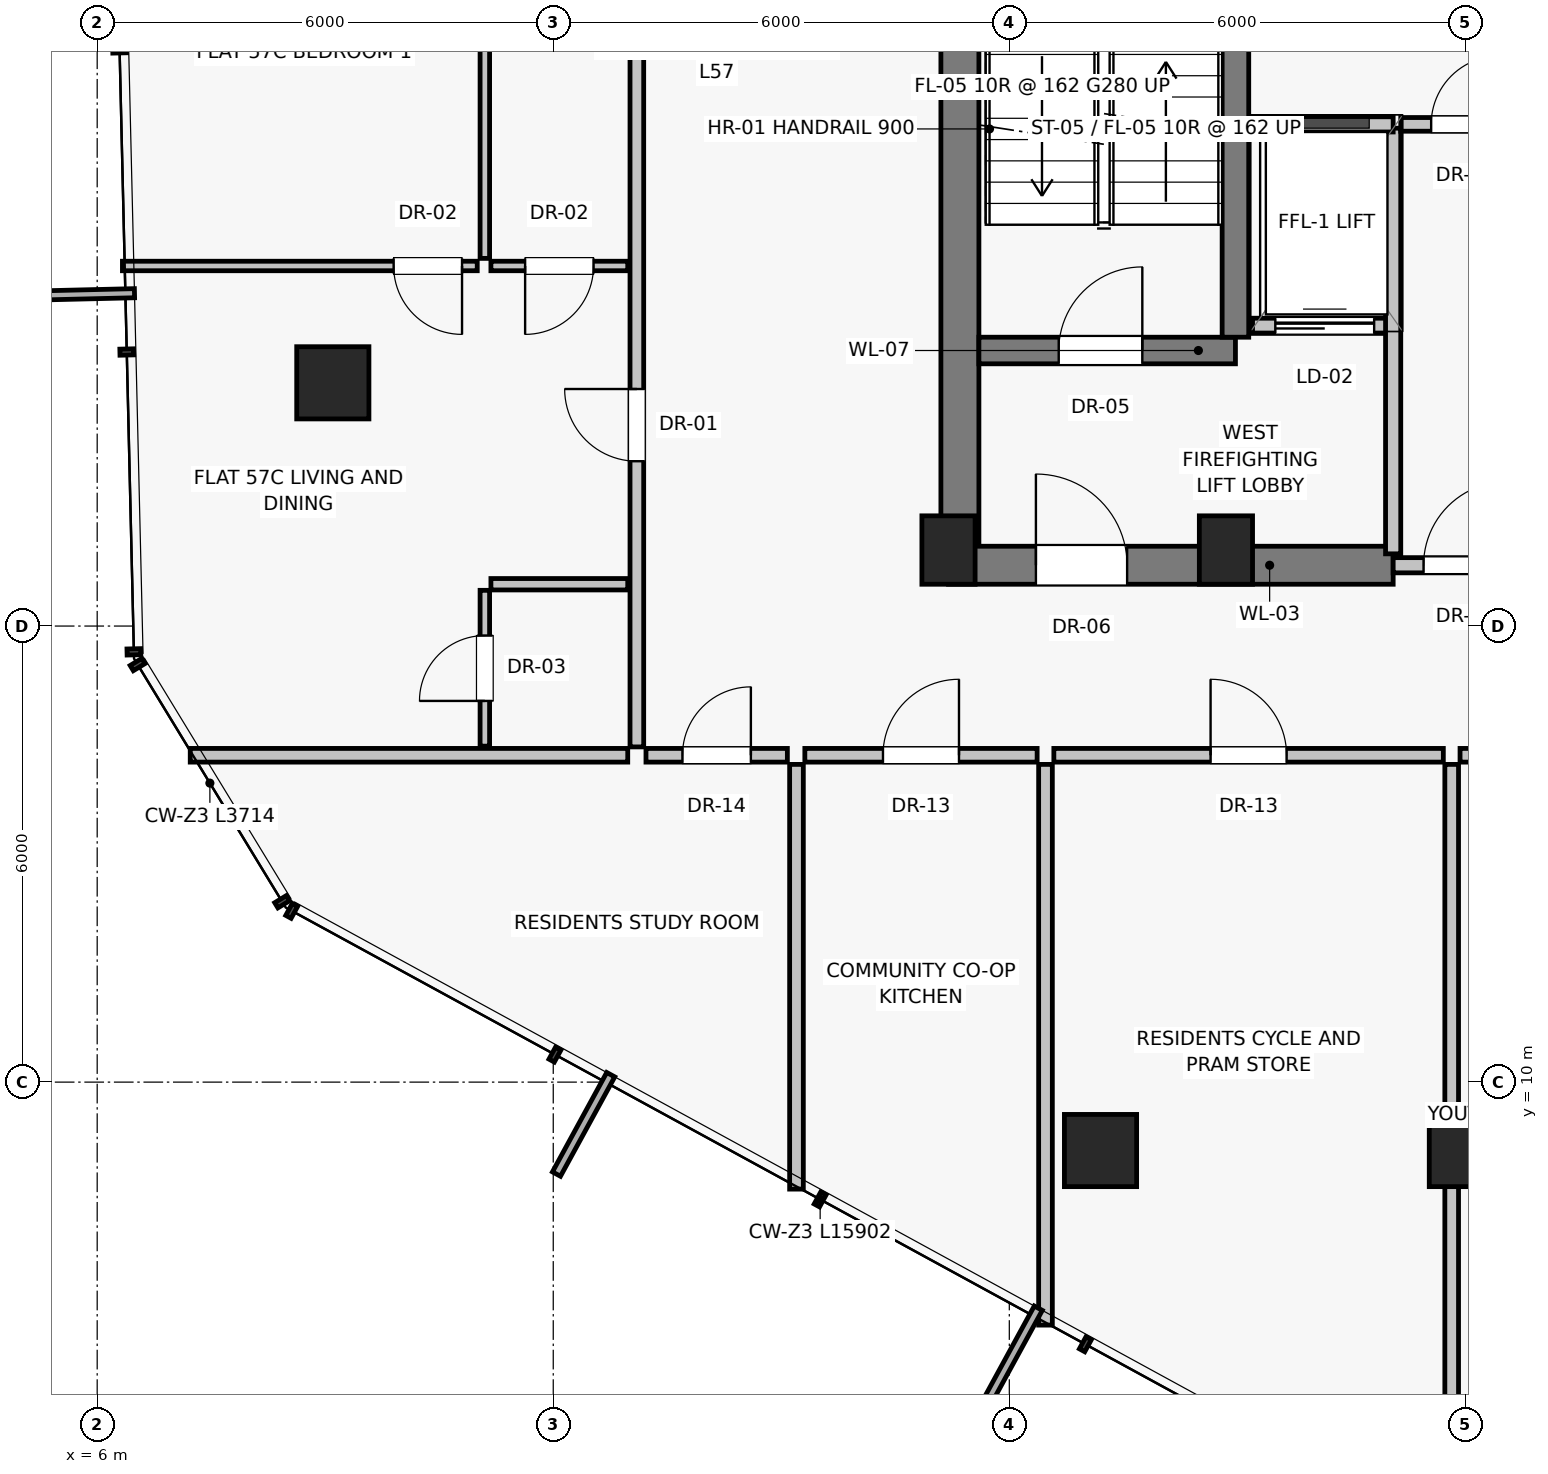
"""IFC4 building model, lengths in metres.
Left out: names, types, materials, properties, quantities, classifications, styles, units other than length and angle.
Written with IfcOpenShell. Run it as: python <this file> out.ifc"""

import sys

from ifc_helpers import new_model, si_unit, direction, frame, frame_2d, origin, origin_2d, place, context, subcontext, project, spatial, rectangle, extrude, source, transform, mapped, element, fill, save


model = new_model("IFC4")
c1 = context("Model", 3, precision=1e-05, world=origin(), true_north=direction((0.0, 1.0)))
c2 = subcontext(c1, "Body", "Model", "MODEL_VIEW")
j1 = project(units=[si_unit("LENGTHUNIT", "METRE"), si_unit("PLANEANGLEUNIT", "RADIAN")], contexts=[c1])
p1 = place(None, origin())
s1 = spatial("IfcSite", under=j1, at=p1, CompositionType="ELEMENT")
p2 = place(p1, origin())
s2 = spatial("IfcBuilding", under=s1, at=p2, CompositionType="ELEMENT")
p3 = place(p2, frame((0.0, 0.0, 201.6)))
s3 = spatial("IfcBuildingStorey", under=s2, at=p3, CompositionType="ELEMENT", Elevation=201.6)
for number, where, z_axis, x_axis in (
    (1, (17.2, 17.0, 0.0), (0.0, 0.0, 1.0), (1.0, 0.0, 0.0)),
    (2, (20.85, 17.0, 0.0), (0.0, 0.0, 1.0), (1.0, 0.0, 0.0)),
):
    element("IfcColumn", number, at=place(p3, frame(where, z_axis=z_axis, x_axis=x_axis)), inside=s3, PredefinedType="PILASTER", context=c2, shape_type="SweptSolid", body=[
        extrude(rectangle(XDim=0.7, YDim=0.9, at=origin_2d()), origin(), (0.0, 0.0, 1.0), 3.25),
    ])
for number, where, z_axis, x_axis in (
    (3, (9.1, 24.0, 0.0), (0.0, 0.0, 1.0), (1.0, 0.0, 0.0)),
    (4, (9.1, 19.2, 0.0), (0.0, 0.0, 1.0), (1.0, 0.0, 0.0)),
    (5, (19.2, 9.1, 0.0), (0.0, 0.0, 1.0), (1.0, 0.0, 0.0)),
    (6, (24.0, 9.1, 0.0), (0.0, 0.0, 1.0), (1.0, 0.0, 0.0)),
):
    element("IfcColumn", number, at=place(p3, frame(where, z_axis=z_axis, x_axis=x_axis)), inside=s3, PredefinedType="COLUMN", context=c2, shape_type="SweptSolid", body=[
        extrude(rectangle(XDim=0.95, YDim=0.95, at=origin_2d()), origin(), (0.0, 0.0, 1.0), 3.25),
    ])
p4 = place(p3, frame((17.35, 16.8, 0.0), z_axis=(0.0, 0.0, 1.0), x_axis=(0.0, 1.0, 0.0)))
e7 = element("IfcWall", 7, at=p4, inside=s3, PredefinedType="SHEAR", context=c2, shape_type="SweptSolid", body=[
    extrude(rectangle(XDim=14.2, YDim=0.5, at=frame_2d((7.1, 0.0))), origin(), (0.0, 0.0, 1.0), 3.015),
])
p5 = place(p3, frame((17.2, 16.8, 0.0), z_axis=(0.0, 0.0, 1.0), x_axis=(1.0, 0.0, 0.0)))
e8 = element("IfcWall", 8, at=p5, inside=s3, PredefinedType="SHEAR", context=c2, shape_type="SweptSolid", body=[
    extrude(rectangle(XDim=5.85, YDim=0.5, at=frame_2d((2.925, 0.0))), origin(), (0.0, 0.0, 1.0), 3.015),
])
p6 = place(p5, frame((1.15, 0.0, 0.0)))
e9 = element("IfcOpeningElement", 9, at=p6, cuts=e8, PredefinedType="OPENING", context=c2, shape_type="SweptSolid", body=[
    extrude(rectangle(XDim=1.2, YDim=2.03, at=frame_2d((0.6, 1.015))), frame((0.0, 0.26, 0.0), z_axis=(0.0, -1.0, 0.0), x_axis=(1.0, 0.0, 0.0)), (0.0, 0.0, 1.0), 0.52),
])
p7 = place(p3, frame((23.05, 16.8, 0.0), z_axis=(0.0, 0.0, 1.0), x_axis=(1.0, 0.0, 0.0)))
e10 = element("IfcWall", 10, at=p7, inside=s3, PredefinedType="SOLIDWALL", context=c2, shape_type="SweptSolid", body=[
    extrude(rectangle(XDim=1.9, YDim=0.2, at=frame_2d((0.95, 0.0))), origin(), (0.0, 0.0, 1.0), 2.165),
])
p8 = place(p7, frame((0.4, 0.0, 0.0)))
e11 = element("IfcOpeningElement", 11, at=p8, cuts=e10, PredefinedType="OPENING", context=c2, shape_type="SweptSolid", body=[
    extrude(rectangle(XDim=1.1, YDim=2.03, at=frame_2d((0.55, 1.015))), frame((0.0, 0.11, 0.0), z_axis=(0.0, -1.0, 0.0), x_axis=(1.0, 0.0, 0.0)), (0.0, 0.0, 1.0), 0.22),
])
p9 = place(p3, frame((17.6, 19.625, 0.0), z_axis=(0.0, 0.0, 1.0), x_axis=(1.0, 0.0, 0.0)))
e12 = element("IfcWall", 12, at=p9, inside=s3, PredefinedType="SHEAR", context=c2, shape_type="SweptSolid", body=[
    extrude(rectangle(XDim=3.375, YDim=0.35, at=frame_2d((1.688, 0.0))), origin(), (0.0, 0.0, 1.0), 3.015),
])
p10 = place(p9, frame((1.05, 0.0, 0.0)))
e13 = element("IfcOpeningElement", 13, at=p10, cuts=e12, PredefinedType="OPENING", context=c2, shape_type="SweptSolid", body=[
    extrude(rectangle(XDim=1.1, YDim=2.03, at=frame_2d((0.55, 1.015))), frame((0.0, 0.185, 0.0), z_axis=(0.0, -1.0, 0.0), x_axis=(1.0, 0.0, 0.0)), (0.0, 0.0, 1.0), 0.37),
])
p11 = place(p3, frame((21.2, 19.95, 0.0), z_axis=(0.0, 0.0, 1.0), x_axis=(1.0, 0.0, 0.0)))
e14 = element("IfcWall", 14, at=p11, inside=s3, PredefinedType="SOLIDWALL", context=c2, shape_type="SweptSolid", body=[
    extrude(rectangle(XDim=1.85, YDim=0.2, at=frame_2d((0.925, 0.0))), origin(), (0.0, 0.0, 1.0), 3.015),
])
p12 = place(p11, frame((0.3, 0.0, 0.0)))
e15 = element("IfcOpeningElement", 15, at=p12, cuts=e14, PredefinedType="OPENING", context=c2, shape_type="SweptSolid", body=[
    extrude(rectangle(XDim=1.3, YDim=2.25, at=frame_2d((0.65, 1.125))), frame((0.0, 0.11, 0.0), z_axis=(0.0, -1.0, 0.0), x_axis=(1.0, 0.0, 0.0)), (0.0, 0.0, 1.0), 0.22),
])
p13 = place(p3, frame((20.975, 19.8, 0.0), z_axis=(0.0, 0.0, 1.0), x_axis=(0.0, 1.0, 0.0)))
e16 = element("IfcWall", 16, at=p13, inside=s3, PredefinedType="SHEAR", context=c2, shape_type="SweptSolid", body=[
    extrude(rectangle(XDim=8.775, YDim=0.35, at=frame_2d((4.387, 0.0))), origin(), (0.0, 0.0, 1.0), 3.015),
])
p14 = place(p3, frame((23.05, 16.95, 0.0), z_axis=(0.0, 0.0, 1.0), x_axis=(0.0, 1.0, 0.0)))
e17 = element("IfcWall", 17, at=p14, inside=s3, PredefinedType="SOLIDWALL", context=c2, shape_type="SweptSolid", body=[
    extrude(rectangle(XDim=5.6, YDim=0.2, at=frame_2d((2.8, 0.0))), origin(), (0.0, 0.0, 1.0), 3.015),
])
p15 = place(p3, frame((21.2, 22.6, 0.0), z_axis=(0.0, 0.0, 1.0), x_axis=(1.0, 0.0, 0.0)))
e18 = element("IfcWall", 18, at=p15, inside=s3, PredefinedType="SOLIDWALL", context=c2, shape_type="SweptSolid", body=[
    extrude(rectangle(XDim=1.85, YDim=0.2, at=frame_2d((0.925, 0.0))), origin(), (0.0, 0.0, 1.0), 3.015),
])
p16 = place(p3, frame((23.15, 22.6, 0.0), z_axis=(0.0, 0.0, 1.0), x_axis=(1.0, 0.0, 0.0)))
e19 = element("IfcWall", 19, at=p16, inside=s3, PredefinedType="PARTITIONING", context=c2, shape_type="SweptSolid", body=[
    extrude(rectangle(XDim=1.7, YDim=0.18, at=frame_2d((0.85, 0.0))), origin(), (0.0, 0.0, 1.0), 3.015),
])
p17 = place(p16, frame((0.4, 0.0, 0.0)))
e20 = element("IfcOpeningElement", 20, at=p17, cuts=e19, PredefinedType="OPENING", context=c2, shape_type="SweptSolid", body=[
    extrude(rectangle(XDim=0.9, YDim=2.01, at=frame_2d((0.45, 1.005))), frame((0.0, 0.1, 0.0), z_axis=(0.0, -1.0, 0.0), x_axis=(1.0, 0.0, 0.0)), (0.0, 0.0, 1.0), 0.2),
])
p18 = place(p3, frame((15.2, 14.18, 0.0), z_axis=(0.0, 0.0, 1.0), x_axis=(0.0, -1.0, 0.0)))
e21 = element("IfcWall", 21, at=p18, inside=s3, PredefinedType="PARTITIONING", context=c2, shape_type="SweptSolid", body=[
    extrude(rectangle(XDim=5.587, YDim=0.18, at=frame_2d((2.794, 0.0))), origin(), (0.0, 0.0, 1.0), 3.015),
])
p19 = place(p3, frame((15.31, 14.3, 0.0), z_axis=(0.0, 0.0, 1.0), x_axis=(1.0, 0.0, 0.0)))
e22 = element("IfcWall", 22, at=p19, inside=s3, PredefinedType="PARTITIONING", context=c2, shape_type="SweptSolid", body=[
    extrude(rectangle(XDim=3.056, YDim=0.18, at=frame_2d((1.528, 0.0))), origin(), (0.0, 0.0, 1.0), 3.015),
])
p20 = place(p19, frame((1.028, 0.0, 0.0)))
e23 = element("IfcOpeningElement", 23, at=p20, cuts=e22, PredefinedType="OPENING", context=c2, shape_type="SweptSolid", body=[
    extrude(rectangle(XDim=1.0, YDim=2.01, at=frame_2d((0.5, 1.005))), frame((0.0, 0.1, 0.0), z_axis=(0.0, -1.0, 0.0), x_axis=(1.0, 0.0, 0.0)), (0.0, 0.0, 1.0), 0.2),
])
p21 = place(p3, frame((18.586, 14.3, 0.0), z_axis=(0.0, 0.0, 1.0), x_axis=(1.0, 0.0, 0.0)))
e24 = element("IfcWall", 24, at=p21, inside=s3, PredefinedType="PARTITIONING", context=c2, shape_type="SweptSolid", body=[
    extrude(rectangle(XDim=5.124, YDim=0.18, at=frame_2d((2.562, 0.0))), origin(), (0.0, 0.0, 1.0), 3.015),
])
p22 = place(p21, frame((2.062, 0.0, 0.0)))
e25 = element("IfcOpeningElement", 25, at=p22, cuts=e24, PredefinedType="OPENING", context=c2, shape_type="SweptSolid", body=[
    extrude(rectangle(XDim=1.0, YDim=2.01, at=frame_2d((0.5, 1.005))), frame((0.0, 0.1, 0.0), z_axis=(0.0, -1.0, 0.0), x_axis=(1.0, 0.0, 0.0)), (0.0, 0.0, 1.0), 0.2),
])
p23 = place(p3, frame((18.476, 14.18, 0.0), z_axis=(0.0, 0.0, 1.0), x_axis=(0.0, -1.0, 0.0)))
e26 = element("IfcWall", 26, at=p23, inside=s3, PredefinedType="PARTITIONING", context=c2, shape_type="SweptSolid", body=[
    extrude(rectangle(XDim=7.376, YDim=0.18, at=frame_2d((3.688, 0.0))), origin(), (0.0, 0.0, 1.0), 3.015),
])
p24 = place(p3, frame((23.82, 14.18, 0.0), z_axis=(0.0, 0.0, 1.0), x_axis=(0.0, -1.0, 0.0)))
e27 = element("IfcWall", 27, at=p24, inside=s3, PredefinedType="PARTITIONING", context=c2, shape_type="SweptSolid", body=[
    extrude(rectangle(XDim=9.563, YDim=0.18, at=frame_2d((4.781, 0.0))), origin(), (0.0, 0.0, 1.0), 3.015),
])
p25 = place(p3, frame((23.93, 14.3, 0.0), z_axis=(0.0, 0.0, 1.0), x_axis=(1.0, 0.0, 0.0)))
e28 = element("IfcWall", 28, at=p25, inside=s3, PredefinedType="PARTITIONING", context=c2, shape_type="SweptSolid", body=[
    extrude(rectangle(XDim=2.584, YDim=0.18, at=frame_2d((1.292, 0.0))), origin(), (0.0, 0.0, 1.0), 3.015),
])
p26 = place(p25, frame((0.792, 0.0, 0.0)))
e29 = element("IfcOpeningElement", 29, at=p26, cuts=e28, PredefinedType="OPENING", context=c2, shape_type="SweptSolid", body=[
    extrude(rectangle(XDim=1.0, YDim=2.01, at=frame_2d((0.5, 1.005))), frame((0.0, 0.1, 0.0), z_axis=(0.0, -1.0, 0.0), x_axis=(1.0, 0.0, 0.0)), (0.0, 0.0, 1.0), 0.2),
])
p27 = place(p3, frame((12.98, 14.3, 0.0), z_axis=(0.0, 0.0, 1.0), x_axis=(-1.0, 0.0, 0.0)))
e30 = element("IfcWall", 30, at=p27, inside=s3, PredefinedType="PARTITIONING", context=c2, shape_type="SweptSolid", body=[
    extrude(rectangle(XDim=5.756, YDim=0.18, at=frame_2d((2.878, 0.0))), origin(), (0.0, 0.0, 1.0), 3.015),
])
p28 = place(p3, frame((13.1, 14.41, 0.0), z_axis=(0.0, 0.0, 1.0), x_axis=(0.0, 1.0, 0.0)))
e31 = element("IfcWall", 31, at=p28, inside=s3, PredefinedType="PARTITIONING", context=c2, shape_type="SweptSolid", body=[
    extrude(rectangle(XDim=11.484, YDim=0.18, at=frame_2d((5.742, 0.0))), origin(), (0.0, 0.0, 1.0), 2.662),
])
p29 = place(p28, frame((3.759, 0.0, 0.0)))
e32 = element("IfcOpeningElement", 32, at=p29, cuts=e31, PredefinedType="OPENING", context=c2, shape_type="SweptSolid", body=[
    extrude(rectangle(XDim=0.95, YDim=2.02, at=frame_2d((0.475, 1.01))), frame((0.0, 0.1, 0.0), z_axis=(0.0, -1.0, 0.0), x_axis=(1.0, 0.0, 0.0)), (0.0, 0.0, 1.0), 0.2),
])
p30 = place(p3, frame((12.98, 16.55, 0.0), z_axis=(0.0, 0.0, 1.0), x_axis=(-1.0, 0.0, 0.0)))
e33 = element("IfcWall", 33, at=p30, inside=s3, PredefinedType="PARTITIONING", context=c2, shape_type="SweptSolid", body=[
    extrude(rectangle(XDim=1.8, YDim=0.15, at=frame_2d((0.9, 0.0))), origin(), (0.0, 0.0, 1.0), 3.015),
])
p31 = place(p3, frame((11.1, 14.42, 0.0), z_axis=(0.0, 0.0, 1.0), x_axis=(0.0, 1.0, 0.0)))
e34 = element("IfcWall", 34, at=p31, inside=s3, PredefinedType="PARTITIONING", context=c2, shape_type="SweptSolid", body=[
    extrude(rectangle(XDim=2.05, YDim=0.125, at=frame_2d((1.025, 0.0))), origin(), (0.0, 0.0, 1.0), 3.015),
])
p32 = place(p31, frame((0.595, 0.0, 0.0)))
e35 = element("IfcOpeningElement", 35, at=p32, cuts=e34, PredefinedType="OPENING", context=c2, shape_type="SweptSolid", body=[
    extrude(rectangle(XDim=0.86, YDim=2.01, at=frame_2d((0.43, 1.005))), frame((0.0, 0.073, 0.0), z_axis=(0.0, -1.0, 0.0), x_axis=(1.0, 0.0, 0.0)), (0.0, 0.0, 1.0), 0.145),
])
p33 = place(p3, frame((12.98, 20.737, 0.0), z_axis=(0.0, 0.0, 1.0), x_axis=(-1.0, 0.0, 0.0)))
e36 = element("IfcWall", 36, at=p33, inside=s3, PredefinedType="PARTITIONING", context=c2, shape_type="SweptSolid", body=[
    extrude(rectangle(XDim=1.8, YDim=0.125, at=frame_2d((0.9, 0.0))), origin(), (0.0, 0.0, 1.0), 3.015),
])
p34 = place(p33, frame((0.45, 0.0, 0.0)))
e37 = element("IfcOpeningElement", 37, at=p34, cuts=e36, PredefinedType="OPENING", context=c2, shape_type="SweptSolid", body=[
    extrude(rectangle(XDim=0.9, YDim=2.01, at=frame_2d((0.45, 1.005))), frame((0.0, 0.073, 0.0), z_axis=(0.0, -1.0, 0.0), x_axis=(1.0, 0.0, 0.0)), (0.0, 0.0, 1.0), 0.145),
])
p35 = place(p3, frame((11.1, 20.837, 0.0), z_axis=(0.0, 0.0, 1.0), x_axis=(0.0, 1.0, 0.0)))
e38 = element("IfcWall", 38, at=p35, inside=s3, PredefinedType="PARTITIONING", context=c2, shape_type="SweptSolid", body=[
    extrude(rectangle(XDim=5.047, YDim=0.125, at=frame_2d((2.523, 0.0))), origin(), (0.0, 0.0, 1.0), 3.015),
])
p36 = place(p3, frame((11.0, 20.737, 0.0), z_axis=(0.0, 0.0, 1.0), x_axis=(-1.0, 0.0, 0.0)))
e39 = element("IfcWall", 39, at=p36, inside=s3, PredefinedType="PARTITIONING", context=c2, shape_type="SweptSolid", body=[
    extrude(rectangle(XDim=4.668, YDim=0.125, at=frame_2d((2.334, 0.0))), origin(), (0.0, 0.0, 1.0), 3.015),
])
p37 = place(p36, frame((0.2, 0.0, 0.0)))
e40 = element("IfcOpeningElement", 40, at=p37, cuts=e39, PredefinedType="OPENING", context=c2, shape_type="SweptSolid", body=[
    extrude(rectangle(XDim=0.9, YDim=2.01, at=frame_2d((0.45, 1.005))), frame((0.0, 0.073, 0.0), z_axis=(0.0, -1.0, 0.0), x_axis=(1.0, 0.0, 0.0)), (0.0, 0.0, 1.0), 0.145),
])
p38 = place(p3, frame((13.22, 14.3, 0.0), z_axis=(0.0, 0.0, 1.0), x_axis=(1.0, 0.0, 0.0)))
e41 = element("IfcWall", 41, at=p38, inside=s3, PredefinedType="PARTITIONING", context=c2, shape_type="SweptSolid", body=[
    extrude(rectangle(XDim=1.86, YDim=0.18, at=frame_2d((0.93, 0.0))), origin(), (0.0, 0.0, 1.0), 3.015),
])
p39 = place(p38, frame((0.48, 0.0, 0.0)))
e42 = element("IfcOpeningElement", 42, at=p39, cuts=e41, PredefinedType="OPENING", context=c2, shape_type="SweptSolid", body=[
    extrude(rectangle(XDim=0.9, YDim=2.01, at=frame_2d((0.45, 1.005))), frame((0.0, 0.1, 0.0), z_axis=(0.0, -1.0, 0.0), x_axis=(1.0, 0.0, 0.0)), (0.0, 0.0, 1.0), 0.2),
])
m1 = source(origin(), c2, "Body", "SweptSolid", [
    extrude(rectangle(XDim=1.2, YDim=2.03, at=frame_2d((0.6, 1.015))), frame((0.0, 0.025, 0.0), z_axis=(0.0, -1.0, 0.0), x_axis=(1.0, 0.0, 0.0)), (0.0, 0.0, 1.0), 0.05),
])
p40 = place(p6, origin())
e43 = element("IfcDoor", 43, at=p40, inside=s3, OperationType="SINGLE_SWING_LEFT", PredefinedType="DOOR", context=c2, shape_type="MappedRepresentation", body=[
    mapped(m1, transform((0.0, 0.0, 0.0), scale=1.0)),
])
fill(e9, e43)
m2 = source(origin(), c2, "Body", "SweptSolid", [
    extrude(rectangle(XDim=1.1, YDim=2.03, at=frame_2d((0.55, 1.015))), frame((0.0, 0.025, 0.0), z_axis=(0.0, -1.0, 0.0), x_axis=(1.0, 0.0, 0.0)), (0.0, 0.0, 1.0), 0.05),
])
p41 = place(p8, origin())
e44 = element("IfcDoor", 44, at=p41, inside=s3, OperationType="SINGLE_SWING_RIGHT", PredefinedType="DOOR", context=c2, shape_type="MappedRepresentation", body=[
    mapped(m2, transform((0.0, 0.0, 0.0), scale=1.0)),
])
fill(e11, e44)
p42 = place(p10, origin())
e45 = element("IfcDoor", 45, at=p42, inside=s3, OperationType="SINGLE_SWING_RIGHT", PredefinedType="DOOR", context=c2, shape_type="MappedRepresentation", body=[
    mapped(m2, transform((0.0, 0.0, 0.0), scale=1.0)),
])
fill(e13, e45)
m3 = source(origin(), c2, "Body", "SweptSolid", [
    extrude(rectangle(XDim=1.3, YDim=2.25, at=frame_2d((0.65, 1.125))), frame((0.0, 0.025, 0.0), z_axis=(0.0, -1.0, 0.0), x_axis=(1.0, 0.0, 0.0)), (0.0, 0.0, 1.0), 0.05),
])
p43 = place(p12, origin())
e46 = element("IfcDoor", 46, at=p43, inside=s3, OperationType="SLIDING_TO_LEFT", PredefinedType="DOOR", context=c2, shape_type="MappedRepresentation", body=[
    mapped(m3, transform((0.0, 0.0, 0.0), scale=1.0)),
])
fill(e15, e46)
m4 = source(origin(), c2, "Body", "SweptSolid", [
    extrude(rectangle(XDim=0.9, YDim=2.01, at=frame_2d((0.45, 1.005))), frame((0.0, 0.025, 0.0), z_axis=(0.0, -1.0, 0.0), x_axis=(1.0, 0.0, 0.0)), (0.0, 0.0, 1.0), 0.05),
])
p44 = place(p17, origin())
e47 = element("IfcDoor", 47, at=p44, inside=s3, OperationType="SINGLE_SWING_RIGHT", PredefinedType="DOOR", context=c2, shape_type="MappedRepresentation", body=[
    mapped(m4, transform((0.0, 0.0, 0.0), scale=1.0)),
])
fill(e20, e47)
m5 = source(origin(), c2, "Body", "SweptSolid", [
    extrude(rectangle(XDim=1.0, YDim=2.01, at=frame_2d((0.5, 1.005))), frame((0.0, 0.025, 0.0), z_axis=(0.0, -1.0, 0.0), x_axis=(1.0, 0.0, 0.0)), (0.0, 0.0, 1.0), 0.05),
])
p45 = place(p20, origin())
e48 = element("IfcDoor", 48, at=p45, inside=s3, OperationType="SINGLE_SWING_RIGHT", PredefinedType="DOOR", context=c2, shape_type="MappedRepresentation", body=[
    mapped(m5, transform((0.0, 0.0, 0.0), scale=1.0)),
])
fill(e23, e48)
p46 = place(p22, origin())
e49 = element("IfcDoor", 49, at=p46, inside=s3, OperationType="SINGLE_SWING_LEFT", PredefinedType="DOOR", context=c2, shape_type="MappedRepresentation", body=[
    mapped(m5, transform((0.0, 0.0, 0.0), scale=1.0)),
])
fill(e25, e49)
m6 = source(origin(), c2, "Body", "SweptSolid", [
    extrude(rectangle(XDim=0.95, YDim=2.02, at=frame_2d((0.475, 1.01))), frame((0.0, 0.025, 0.0), z_axis=(0.0, -1.0, 0.0), x_axis=(1.0, 0.0, 0.0)), (0.0, 0.0, 1.0), 0.05),
])
p47 = place(p29, origin())
e50 = element("IfcDoor", 50, at=p47, inside=s3, OperationType="SINGLE_SWING_RIGHT", PredefinedType="DOOR", context=c2, shape_type="MappedRepresentation", body=[
    mapped(m6, transform((0.0, 0.0, 0.0), scale=1.0)),
])
fill(e32, e50)
m7 = source(origin(), c2, "Body", "SweptSolid", [
    extrude(rectangle(XDim=0.86, YDim=2.01, at=frame_2d((0.43, 1.005))), frame((0.0, 0.025, 0.0), z_axis=(0.0, -1.0, 0.0), x_axis=(1.0, 0.0, 0.0)), (0.0, 0.0, 1.0), 0.05),
])
p48 = place(p32, origin())
e51 = element("IfcDoor", 51, at=p48, inside=s3, OperationType="SINGLE_SWING_LEFT", PredefinedType="DOOR", context=c2, shape_type="MappedRepresentation", body=[
    mapped(m7, transform((0.0, 0.0, 0.0), scale=1.0)),
])
fill(e35, e51)
p49 = place(p34, origin())
e52 = element("IfcDoor", 52, at=p49, inside=s3, OperationType="SINGLE_SWING_RIGHT", PredefinedType="DOOR", context=c2, shape_type="MappedRepresentation", body=[
    mapped(m4, transform((0.0, 0.0, 0.0), scale=1.0)),
])
fill(e37, e52)
p50 = place(p37, origin())
e53 = element("IfcDoor", 53, at=p50, inside=s3, OperationType="SINGLE_SWING_LEFT", PredefinedType="DOOR", context=c2, shape_type="MappedRepresentation", body=[
    mapped(m4, transform((0.0, 0.0, 0.0), scale=1.0)),
])
fill(e40, e53)
p51 = place(p39, origin())
e54 = element("IfcDoor", 54, at=p51, inside=s3, OperationType="SINGLE_SWING_RIGHT", PredefinedType="DOOR", context=c2, shape_type="MappedRepresentation", body=[
    mapped(m4, transform((0.0, 0.0, 0.0), scale=1.0)),
])
fill(e42, e54)
save(model, sys.argv[1])
